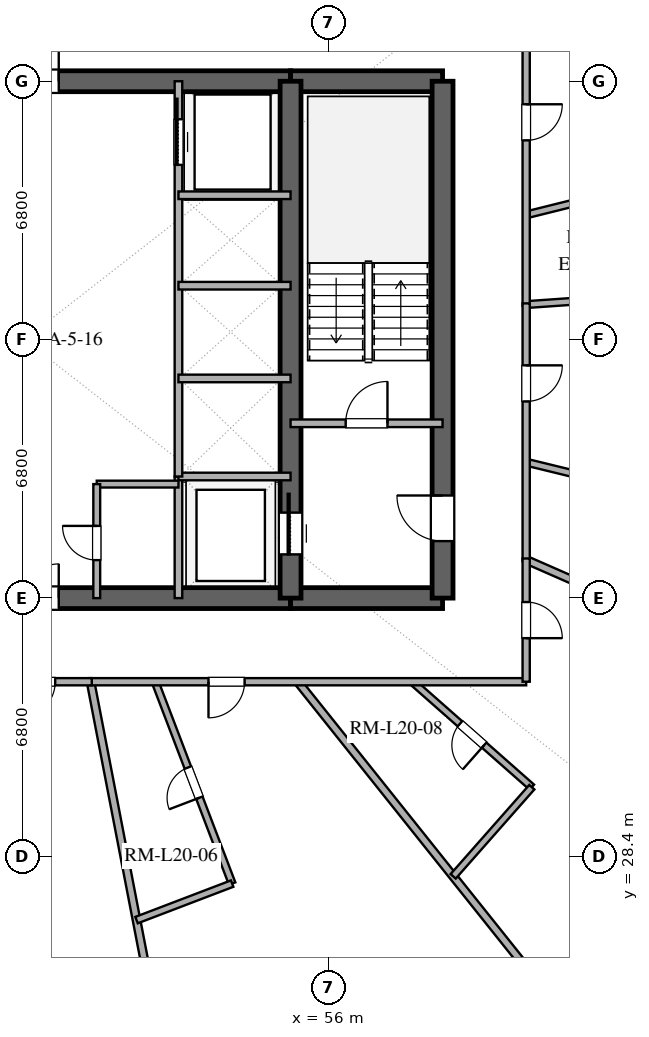
"""IFC4 building model, lengths in metres.
Left out: names, types, materials, properties, quantities, classifications, styles, units other than length and angle.
Written with IfcOpenShell. Run it as: python <this file> out.ifc"""

import sys

from ifc_helpers import new_model, si_unit, direction, frame, frame_2d, origin, place, context, subcontext, project, spatial, rectangle, extrude, element, fill, save


model = new_model("IFC4")
c1 = context("Model", 3, precision=1e-05, world=origin(), true_north=direction((0.0, 1.0)))
c2 = subcontext(c1, "Body", "Model", "MODEL_VIEW")
j1 = project(units=[si_unit("LENGTHUNIT", "METRE"), si_unit("PLANEANGLEUNIT", "RADIAN")], contexts=[c1])
p1 = place(None, origin())
s1 = spatial("IfcSite", under=j1, at=p1, CompositionType="ELEMENT")
p2 = place(p1, origin())
s2 = spatial("IfcBuilding", under=s1, at=p2, CompositionType="ELEMENT")
p3 = place(p2, frame((0.0, 0.0, 84.0)))
s3 = spatial("IfcBuildingStorey", under=s2, at=p3, CompositionType="ELEMENT", Elevation=84.0)
p4 = place(p3, frame((41.0, 35.2, 0.0), z_axis=(0.0, 0.0, 1.0), x_axis=(1.0, 0.0, 0.0)))
e1 = element("IfcWall", 1, at=p4, inside=s3, PredefinedType="SHEAR", context=c2, shape_type="SweptSolid", body=[
    extrude(rectangle(XDim=14.0, YDim=0.55, at=frame_2d((7.0, 0.0))), origin(), (0.0, 0.0, 1.0), 3.38),
])
p5 = place(p4, frame((6.1, 0.0, 0.0)))
e2 = element("IfcOpeningElement", 2, at=p5, cuts=e1, PredefinedType="OPENING", context=c2, shape_type="SweptSolid", body=[
    extrude(rectangle(XDim=1.8, YDim=2.25, at=frame_2d((0.9, 1.125))), frame((0.0, 0.285, 0.0), z_axis=(0.0, -1.0, 0.0), x_axis=(1.0, 0.0, 0.0)), (0.0, 0.0, 1.0), 0.57),
])
p6 = place(p3, frame((55.0, 35.2, 0.0), z_axis=(0.0, 0.0, 1.0), x_axis=(1.0, 0.0, 0.0)))
e3 = element("IfcWall", 3, at=p6, inside=s3, PredefinedType="SHEAR", context=c2, shape_type="SweptSolid", body=[
    extrude(rectangle(XDim=4.0, YDim=0.55, at=frame_2d((2.0, 0.0))), origin(), (0.0, 0.0, 1.0), 3.38),
])
p7 = place(p3, frame((41.0, 48.8, 0.0), z_axis=(0.0, 0.0, 1.0), x_axis=(1.0, 0.0, 0.0)))
e4 = element("IfcWall", 4, at=p7, inside=s3, PredefinedType="SHEAR", context=c2, shape_type="SweptSolid", body=[
    extrude(rectangle(XDim=14.0, YDim=0.55, at=frame_2d((7.0, 0.0))), origin(), (0.0, 0.0, 1.0), 3.38),
])
p8 = place(p7, frame((6.1, 0.0, 0.0)))
e5 = element("IfcOpeningElement", 5, at=p8, cuts=e4, PredefinedType="OPENING", context=c2, shape_type="SweptSolid", body=[
    extrude(rectangle(XDim=1.8, YDim=2.25, at=frame_2d((0.9, 1.125))), frame((0.0, 0.285, 0.0), z_axis=(0.0, -1.0, 0.0), x_axis=(1.0, 0.0, 0.0)), (0.0, 0.0, 1.0), 0.57),
])
p9 = place(p3, frame((55.0, 48.8, 0.0), z_axis=(0.0, 0.0, 1.0), x_axis=(1.0, 0.0, 0.0)))
e6 = element("IfcWall", 6, at=p9, inside=s3, PredefinedType="SHEAR", context=c2, shape_type="SweptSolid", body=[
    extrude(rectangle(XDim=4.0, YDim=0.55, at=frame_2d((2.0, 0.0))), origin(), (0.0, 0.0, 1.0), 3.38),
])
p10 = place(p3, frame((59.0, 35.2, 0.0), z_axis=(0.0, 0.0, 1.0), x_axis=(0.0, 1.0, 0.0)))
e7 = element("IfcWall", 7, at=p10, inside=s3, PredefinedType="SHEAR", context=c2, shape_type="SweptSolid", body=[
    extrude(rectangle(XDim=13.6, YDim=0.55, at=frame_2d((6.8, 0.0))), origin(), (0.0, 0.0, 1.0), 3.38),
])
p11 = place(p10, frame((1.5, 0.0, 0.0)))
e8 = element("IfcOpeningElement", 8, at=p11, cuts=e7, PredefinedType="OPENING", context=c2, shape_type="SweptSolid", body=[
    extrude(rectangle(XDim=1.2, YDim=2.15, at=frame_2d((0.6, 1.075))), frame((0.0, 0.285, 0.0), z_axis=(0.0, -1.0, 0.0), x_axis=(1.0, 0.0, 0.0)), (0.0, 0.0, 1.0), 0.57),
])
p12 = place(p3, frame((55.0, 35.2, 0.0), z_axis=(0.0, 0.0, 1.0), x_axis=(0.0, 1.0, 0.0)))
e9 = element("IfcWall", 9, at=p12, inside=s3, PredefinedType="SHEAR", context=c2, shape_type="SweptSolid", body=[
    extrude(rectangle(XDim=13.6, YDim=0.55, at=frame_2d((6.8, 0.0))), origin(), (0.0, 0.0, 1.0), 3.38),
])
p13 = place(p12, frame((1.15, 0.0, 0.0)))
e10 = element("IfcOpeningElement", 10, at=p13, cuts=e9, PredefinedType="OPENING", context=c2, shape_type="SweptSolid", body=[
    extrude(rectangle(XDim=1.1, YDim=2.2, at=frame_2d((0.55, 1.1))), frame((0.0, 0.285, 0.0), z_axis=(0.0, -1.0, 0.0), x_axis=(1.0, 0.0, 0.0)), (0.0, 0.0, 1.0), 0.57),
])
p14 = place(p3, frame((55.0, 39.8, 0.0), z_axis=(0.0, 0.0, 1.0), x_axis=(1.0, 0.0, 0.0)))
e11 = element("IfcWall", 11, at=p14, inside=s3, PredefinedType="SOLIDWALL", context=c2, shape_type="SweptSolid", body=[
    extrude(rectangle(XDim=4.0, YDim=0.2, at=frame_2d((2.0, 0.0))), origin(), (0.0, 0.0, 1.0), 2.74),
])
p15 = place(p14, frame((1.45, 0.0, 0.0)))
e12 = element("IfcOpeningElement", 12, at=p15, cuts=e11, PredefinedType="OPENING", context=c2, shape_type="SweptSolid", body=[
    extrude(rectangle(XDim=1.1, YDim=2.15, at=frame_2d((0.55, 1.075))), frame((0.0, 0.11, 0.0), z_axis=(0.0, -1.0, 0.0), x_axis=(1.0, 0.0, 0.0)), (0.0, 0.0, 1.0), 0.22),
])
p16 = place(p3, frame((52.05, 35.2, 0.0), z_axis=(0.0, 0.0, 1.0), x_axis=(0.0, 1.0, 0.0)))
e13 = element("IfcWall", 13, at=p16, inside=s3, PredefinedType="SOLIDWALL", context=c2, shape_type="SweptSolid", body=[
    extrude(rectangle(XDim=3.2, YDim=0.2, at=frame_2d((1.6, 0.0))), origin(), (0.0, 0.0, 1.0), 2.74),
])
p17 = place(p3, frame((52.05, 38.4, 0.0), z_axis=(0.0, 0.0, 1.0), x_axis=(1.0, 0.0, 0.0)))
e14 = element("IfcWall", 14, at=p17, inside=s3, PredefinedType="SOLIDWALL", context=c2, shape_type="SweptSolid", body=[
    extrude(rectangle(XDim=2.95, YDim=0.2, at=frame_2d((1.475, 0.0))), origin(), (0.0, 0.0, 1.0), 2.74),
])
p18 = place(p3, frame((52.05, 38.4, 0.0), z_axis=(0.0, 0.0, 1.0), x_axis=(0.0, 1.0, 0.0)))
e15 = element("IfcWall", 15, at=p18, inside=s3, PredefinedType="SOLIDWALL", context=c2, shape_type="SweptSolid", body=[
    extrude(rectangle(XDim=10.4, YDim=0.2, at=frame_2d((5.2, 0.0))), origin(), (0.0, 0.0, 1.0), 2.74),
])
p19 = place(p18, frame((8.2, 0.0, 0.0)))
e16 = element("IfcOpeningElement", 16, at=p19, cuts=e15, PredefinedType="OPENING", context=c2, shape_type="SweptSolid", body=[
    extrude(rectangle(XDim=1.2, YDim=2.2, at=frame_2d((0.6, 1.1))), frame((0.0, 0.11, 0.0), z_axis=(0.0, -1.0, 0.0), x_axis=(1.0, 0.0, 0.0)), (0.0, 0.0, 1.0), 0.22),
])
for number, where, z_axis, x_axis in (
    (17, (52.05, 40.98, 0.0), (0.0, 0.0, 1.0), (1.0, 0.0, 0.0)),
    (18, (52.05, 43.42, 0.0), (0.0, 0.0, 1.0), (1.0, 0.0, 0.0)),
    (19, (52.05, 45.8, 0.0), (0.0, 0.0, 1.0), (1.0, 0.0, 0.0)),
):
    element("IfcWall", number, at=place(p3, frame(where, z_axis=z_axis, x_axis=x_axis)), inside=s3, PredefinedType="SOLIDWALL", context=c2, shape_type="SweptSolid", body=[
        extrude(rectangle(XDim=2.95, YDim=0.2, at=frame_2d((1.475, 0.0))), origin(), (0.0, 0.0, 1.0), 2.74),
    ])
p20 = place(p3, frame((49.9, 38.2, 0.0), z_axis=(0.0, 0.0, 1.0), x_axis=(1.0, 0.0, 0.0)))
e20 = element("IfcWall", 20, at=p20, inside=s3, PredefinedType="PLUMBINGWALL", context=c2, shape_type="SweptSolid", body=[
    extrude(rectangle(XDim=2.15, YDim=0.18, at=frame_2d((1.075, 0.0))), origin(), (0.0, 0.0, 1.0), 2.74),
])
p21 = place(p3, frame((49.9, 35.2, 0.0), z_axis=(0.0, 0.0, 1.0), x_axis=(0.0, 1.0, 0.0)))
e21 = element("IfcWall", 21, at=p21, inside=s3, PredefinedType="PLUMBINGWALL", context=c2, shape_type="SweptSolid", body=[
    extrude(rectangle(XDim=3.0, YDim=0.18, at=frame_2d((1.5, 0.0))), origin(), (0.0, 0.0, 1.0), 2.74),
])
p22 = place(p21, frame((1.0, 0.0, 0.0)))
e22 = element("IfcOpeningElement", 22, at=p22, cuts=e21, PredefinedType="OPENING", context=c2, shape_type="SweptSolid", body=[
    extrude(rectangle(XDim=0.9, YDim=2.1, at=frame_2d((0.45, 1.05))), frame((0.0, 0.1, 0.0), z_axis=(0.0, -1.0, 0.0), x_axis=(1.0, 0.0, 0.0)), (0.0, 0.0, 1.0), 0.2),
])
p23 = place(p3, frame((68.224, 43.414, 0.0), z_axis=(0.0, 0.0, 1.0), x_axis=(-0.997563891584, -0.06975874287, 0.0)))
e23 = element("IfcWall", 23, at=p23, inside=s3, PredefinedType="PLUMBINGWALL", context=c2, shape_type="SweptSolid", body=[
    extrude(rectangle(XDim=7.042, YDim=0.18, at=frame_2d((3.521, 0.0))), origin(), (0.0, 0.0, 1.0), 2.74),
])
p24 = place(p3, frame((49.737, 33.0, 0.0), z_axis=(0.0, 0.0, 1.0), x_axis=(0.18949034594, -0.981882584017, 0.0)))
e24 = element("IfcWall", 24, at=p24, inside=s3, PredefinedType="PARTITIONING", context=c2, shape_type="SweptSolid", body=[
    extrude(rectangle(XDim=13.153, YDim=0.2, at=frame_2d((6.577, 0.0))), origin(), (0.0, 0.0, 1.0), 2.74),
])
p25 = place(p3, frame((61.2, 36.208, 0.0), z_axis=(0.0, 0.0, 1.0), x_axis=(0.915722078144, -0.401812239235, 0.0)))
e25 = element("IfcWall", 25, at=p25, inside=s3, PredefinedType="PARTITIONING", context=c2, shape_type="SweptSolid", body=[
    extrude(rectangle(XDim=12.915, YDim=0.2, at=frame_2d((6.458, 0.0))), origin(), (0.0, 0.0, 1.0), 2.74),
])
p26 = place(p3, frame((67.699, 37.189, 0.0), z_axis=(0.0, 0.0, 1.0), x_axis=(-0.971448370468, 0.237251055878, 0.0)))
e26 = element("IfcWall", 26, at=p26, inside=s3, PredefinedType="PLUMBINGWALL", context=c2, shape_type="SweptSolid", body=[
    extrude(rectangle(XDim=6.69, YDim=0.18, at=frame_2d((3.345, 0.0))), origin(), (0.0, 0.0, 1.0), 2.74),
])
p27 = place(p26, frame((2.92, 0.0, 0.0)))
e27 = element("IfcOpeningElement", 27, at=p27, cuts=e26, PredefinedType="OPENING", context=c2, shape_type="SweptSolid", body=[
    extrude(rectangle(XDim=0.85, YDim=2.1, at=frame_2d((0.425, 1.05))), frame((0.0, 0.1, 0.0), z_axis=(0.0, -1.0, 0.0), x_axis=(1.0, 0.0, 0.0)), (0.0, 0.0, 1.0), 0.2),
])
p28 = place(p3, frame((55.189, 33.0, 0.0), z_axis=(0.0, 0.0, 1.0), x_axis=(0.624085468444, -0.781356082767, 0.0)))
e28 = element("IfcWall", 28, at=p28, inside=s3, PredefinedType="PARTITIONING", context=c2, shape_type="SweptSolid", body=[
    extrude(rectangle(XDim=12.703, YDim=0.2, at=frame_2d((6.352, 0.0))), origin(), (0.0, 0.0, 1.0), 2.74),
])
p29 = place(p3, frame((61.2, 45.284, 0.0), z_axis=(0.0, 0.0, 1.0), x_axis=(0.970426102609, 0.241398383125, 0.0)))
e29 = element("IfcWall", 29, at=p29, inside=s3, PredefinedType="PLUMBINGWALL", context=c2, shape_type="SweptSolid", body=[
    extrude(rectangle(XDim=6.365, YDim=0.18, at=frame_2d((3.183, 0.0))), origin(), (0.0, 0.0, 1.0), 2.74),
])
p30 = place(p29, frame((2.758, 0.0, 0.0)))
e30 = element("IfcOpeningElement", 30, at=p30, cuts=e29, PredefinedType="OPENING", context=c2, shape_type="SweptSolid", body=[
    extrude(rectangle(XDim=0.85, YDim=2.1, at=frame_2d((0.425, 1.05))), frame((0.0, 0.1, 0.0), z_axis=(0.0, -1.0, 0.0), x_axis=(1.0, 0.0, 0.0)), (0.0, 0.0, 1.0), 0.2),
])
p31 = place(p3, frame((53.463, 27.688, 0.0), z_axis=(0.0, 0.0, 1.0), x_axis=(-0.356604128264, 0.934255583716, 0.0)))
e31 = element("IfcWall", 31, at=p31, inside=s3, PredefinedType="PLUMBINGWALL", context=c2, shape_type="SweptSolid", body=[
    extrude(rectangle(XDim=5.686, YDim=0.18, at=frame_2d((2.843, 0.0))), origin(), (0.0, 0.0, 1.0), 2.74),
])
p32 = place(p31, frame((2.418, 0.0, 0.0)))
e32 = element("IfcOpeningElement", 32, at=p32, cuts=e31, PredefinedType="OPENING", context=c2, shape_type="SweptSolid", body=[
    extrude(rectangle(XDim=0.85, YDim=2.1, at=frame_2d((0.425, 1.05))), frame((0.0, 0.1, 0.0), z_axis=(0.0, -1.0, 0.0), x_axis=(1.0, 0.0, 0.0)), (0.0, 0.0, 1.0), 0.2),
])
p33 = place(p3, frame((61.2, 51.0, 0.0), z_axis=(0.0, 0.0, 1.0), x_axis=(0.0, -1.0, 0.0)))
e33 = element("IfcWall", 33, at=p33, inside=s3, PredefinedType="PARTITIONING", context=c2, shape_type="SweptSolid", body=[
    extrude(rectangle(XDim=8.109, YDim=0.19, at=frame_2d((4.055, 0.0))), origin(), (0.0, 0.0, 1.0), 2.74),
])
p34 = place(p33, frame((2.806, 0.0, 0.0)))
e34 = element("IfcOpeningElement", 34, at=p34, cuts=e33, PredefinedType="OPENING", context=c2, shape_type="SweptSolid", body=[
    extrude(rectangle(XDim=0.95, YDim=2.15, at=frame_2d((0.475, 1.075))), frame((0.0, 0.105, 0.0), z_axis=(0.0, -1.0, 0.0), x_axis=(1.0, 0.0, 0.0)), (0.0, 0.0, 1.0), 0.21),
])
p35 = place(p3, frame((61.2, 42.955, 0.0), z_axis=(0.0, 0.0, 1.0), x_axis=(0.0, -1.0, 0.0)))
e35 = element("IfcWall", 35, at=p35, inside=s3, PredefinedType="PARTITIONING", context=c2, shape_type="SweptSolid", body=[
    extrude(rectangle(XDim=6.782, YDim=0.19, at=frame_2d((3.391, 0.0))), origin(), (0.0, 0.0, 1.0), 2.74),
])
p36 = place(p35, frame((1.631, 0.0, 0.0)))
e36 = element("IfcOpeningElement", 36, at=p36, cuts=e35, PredefinedType="OPENING", context=c2, shape_type="SweptSolid", body=[
    extrude(rectangle(XDim=0.95, YDim=2.15, at=frame_2d((0.475, 1.075))), frame((0.0, 0.105, 0.0), z_axis=(0.0, -1.0, 0.0), x_axis=(1.0, 0.0, 0.0)), (0.0, 0.0, 1.0), 0.21),
])
p37 = place(p3, frame((61.348, 30.225, 0.0), z_axis=(0.0, 0.0, 1.0), x_axis=(-0.749931272561, 0.661515749197, 0.0)))
e37 = element("IfcWall", 37, at=p37, inside=s3, PredefinedType="PLUMBINGWALL", context=c2, shape_type="SweptSolid", body=[
    extrude(rectangle(XDim=4.194, YDim=0.18, at=frame_2d((2.097, 0.0))), origin(), (0.0, 0.0, 1.0), 2.74),
])
p38 = place(p37, frame((1.672, 0.0, 0.0)))
e38 = element("IfcOpeningElement", 38, at=p38, cuts=e37, PredefinedType="OPENING", context=c2, shape_type="SweptSolid", body=[
    extrude(rectangle(XDim=0.85, YDim=2.1, at=frame_2d((0.425, 1.05))), frame((0.0, 0.1, 0.0), z_axis=(0.0, -1.0, 0.0), x_axis=(1.0, 0.0, 0.0)), (0.0, 0.0, 1.0), 0.2),
])
p39 = place(p3, frame((61.2, 33.0, 0.0), z_axis=(0.0, 0.0, 1.0), x_axis=(-1.0, 0.0, 0.0)))
e39 = element("IfcWall", 39, at=p39, inside=s3, PredefinedType="PARTITIONING", context=c2, shape_type="SweptSolid", body=[
    extrude(rectangle(XDim=11.496, YDim=0.19, at=frame_2d((5.748, 0.0))), origin(), (0.0, 0.0, 1.0), 2.74),
])
p40 = place(p39, frame((7.41, 0.0, 0.0)))
e40 = element("IfcOpeningElement", 40, at=p40, cuts=e39, PredefinedType="OPENING", context=c2, shape_type="SweptSolid", body=[
    extrude(rectangle(XDim=0.95, YDim=2.15, at=frame_2d((0.475, 1.075))), frame((0.0, 0.105, 0.0), z_axis=(0.0, -1.0, 0.0), x_axis=(1.0, 0.0, 0.0)), (0.0, 0.0, 1.0), 0.21),
])
p41 = place(p3, frame((61.2, 36.243, 0.0), z_axis=(0.0, 0.0, 1.0), x_axis=(0.0, -1.0, 0.0)))
e41 = element("IfcWall", 41, at=p41, inside=s3, PredefinedType="PARTITIONING", context=c2, shape_type="SweptSolid", body=[
    extrude(rectangle(XDim=3.243, YDim=0.19, at=frame_2d((1.621, 0.0))), origin(), (0.0, 0.0, 1.0), 2.74),
])
p42 = place(p41, frame((1.146, 0.0, 0.0)))
e42 = element("IfcOpeningElement", 42, at=p42, cuts=e41, PredefinedType="OPENING", context=c2, shape_type="SweptSolid", body=[
    extrude(rectangle(XDim=0.95, YDim=2.15, at=frame_2d((0.475, 1.075))), frame((0.0, 0.105, 0.0), z_axis=(0.0, -1.0, 0.0), x_axis=(1.0, 0.0, 0.0)), (0.0, 0.0, 1.0), 0.21),
])
p43 = place(p3, frame((59.279, 27.879, 0.0), z_axis=(0.0, 0.0, 1.0), x_axis=(0.661515810511, 0.749931218475, 0.0)))
e43 = element("IfcWall", 43, at=p43, inside=s3, PredefinedType="PLUMBINGWALL", context=c2, shape_type="SweptSolid", body=[
    extrude(rectangle(XDim=3.129, YDim=0.18, at=frame_2d((1.564, 0.0))), origin(), (0.0, 0.0, 1.0), 2.74),
])
p44 = place(p3, frame((49.77, 33.0, 0.0), z_axis=(0.0, 0.0, 1.0), x_axis=(-1.0, 0.0, 0.0)))
e44 = element("IfcWall", 44, at=p44, inside=s3, PredefinedType="PARTITIONING", context=c2, shape_type="SweptSolid", body=[
    extrude(rectangle(XDim=2.875, YDim=0.19, at=frame_2d((1.438, 0.0))), origin(), (0.0, 0.0, 1.0), 2.74),
])
p45 = place(p44, frame((0.962, 0.0, 0.0)))
e45 = element("IfcOpeningElement", 45, at=p45, cuts=e44, PredefinedType="OPENING", context=c2, shape_type="SweptSolid", body=[
    extrude(rectangle(XDim=0.95, YDim=2.15, at=frame_2d((0.475, 1.075))), frame((0.0, 0.105, 0.0), z_axis=(0.0, -1.0, 0.0), x_axis=(1.0, 0.0, 0.0)), (0.0, 0.0, 1.0), 0.21),
])
p46 = place(p3, frame((50.948, 26.728, 0.0), z_axis=(0.0, 0.0, 1.0), x_axis=(0.934244754769, 0.35663249738, 0.0)))
e46 = element("IfcWall", 46, at=p46, inside=s3, PredefinedType="PLUMBINGWALL", context=c2, shape_type="SweptSolid", body=[
    extrude(rectangle(XDim=2.692, YDim=0.18, at=frame_2d((1.346, 0.0))), origin(), (0.0, 0.0, 1.0), 2.74),
])
p47 = place(p13, origin())
e47 = element("IfcDoor", 47, at=p47, inside=s3, OperationType="SLIDING_TO_RIGHT", PredefinedType="DOOR", context=c2, shape_type="SweptSolid", body=[
    extrude(rectangle(XDim=1.1, YDim=2.2, at=frame_2d((0.55, 1.1))), frame((0.0, 0.025, 0.0), z_axis=(0.0, -1.0, 0.0), x_axis=(1.0, 0.0, 0.0)), (0.0, 0.0, 1.0), 0.05),
])
fill(e10, e47)
p48 = place(p11, origin())
e48 = element("IfcDoor", 48, at=p48, inside=s3, OperationType="SINGLE_SWING_RIGHT", PredefinedType="DOOR", context=c2, shape_type="SweptSolid", body=[
    extrude(rectangle(XDim=1.2, YDim=2.15, at=frame_2d((0.6, 1.075))), frame((0.0, 0.025, 0.0), z_axis=(0.0, -1.0, 0.0), x_axis=(1.0, 0.0, 0.0)), (0.0, 0.0, 1.0), 0.05),
])
fill(e8, e48)
p49 = place(p5, origin())
e49 = element("IfcDoor", 49, at=p49, inside=s3, OperationType="DOUBLE_DOOR_SINGLE_SWING", PredefinedType="DOOR", context=c2, shape_type="SweptSolid", body=[
    extrude(rectangle(XDim=1.8, YDim=2.25, at=frame_2d((0.9, 1.125))), frame((0.0, 0.025, 0.0), z_axis=(0.0, -1.0, 0.0), x_axis=(1.0, 0.0, 0.0)), (0.0, 0.0, 1.0), 0.05),
])
fill(e2, e49)
p50 = place(p8, origin())
e50 = element("IfcDoor", 50, at=p50, inside=s3, OperationType="DOUBLE_DOOR_SINGLE_SWING", PredefinedType="DOOR", context=c2, shape_type="SweptSolid", body=[
    extrude(rectangle(XDim=1.8, YDim=2.25, at=frame_2d((0.9, 1.125))), frame((0.0, 0.025, 0.0), z_axis=(0.0, -1.0, 0.0), x_axis=(1.0, 0.0, 0.0)), (0.0, 0.0, 1.0), 0.05),
])
fill(e5, e50)
p51 = place(p15, origin())
e51 = element("IfcDoor", 51, at=p51, inside=s3, OperationType="SINGLE_SWING_RIGHT", PredefinedType="DOOR", context=c2, shape_type="SweptSolid", body=[
    extrude(rectangle(XDim=1.1, YDim=2.15, at=frame_2d((0.55, 1.075))), frame((0.0, 0.025, 0.0), z_axis=(0.0, -1.0, 0.0), x_axis=(1.0, 0.0, 0.0)), (0.0, 0.0, 1.0), 0.05),
])
fill(e12, e51)
p52 = place(p19, origin())
e52 = element("IfcDoor", 52, at=p52, inside=s3, OperationType="SLIDING_TO_RIGHT", PredefinedType="DOOR", context=c2, shape_type="SweptSolid", body=[
    extrude(rectangle(XDim=1.2, YDim=2.2, at=frame_2d((0.6, 1.1))), frame((0.0, 0.025, 0.0), z_axis=(0.0, -1.0, 0.0), x_axis=(1.0, 0.0, 0.0)), (0.0, 0.0, 1.0), 0.05),
])
fill(e16, e52)
p53 = place(p22, origin())
e53 = element("IfcDoor", 53, at=p53, inside=s3, OperationType="SINGLE_SWING_RIGHT", PredefinedType="DOOR", context=c2, shape_type="SweptSolid", body=[
    extrude(rectangle(XDim=0.9, YDim=2.1, at=frame_2d((0.45, 1.05))), frame((0.0, 0.025, 0.0), z_axis=(0.0, -1.0, 0.0), x_axis=(1.0, 0.0, 0.0)), (0.0, 0.0, 1.0), 0.05),
])
fill(e22, e53)
p54 = place(p32, origin())
e54 = element("IfcDoor", 54, at=p54, inside=s3, OperationType="SINGLE_SWING_LEFT", PredefinedType="DOOR", context=c2, shape_type="SweptSolid", body=[
    extrude(rectangle(XDim=0.85, YDim=2.1, at=frame_2d((0.425, 1.05))), frame((0.0, 0.025, 0.0), z_axis=(0.0, -1.0, 0.0), x_axis=(1.0, 0.0, 0.0)), (0.0, 0.0, 1.0), 0.05),
])
fill(e32, e54)
p55 = place(p34, origin())
e55 = element("IfcDoor", 55, at=p55, inside=s3, OperationType="SINGLE_SWING_LEFT", PredefinedType="DOOR", context=c2, shape_type="SweptSolid", body=[
    extrude(rectangle(XDim=0.95, YDim=2.15, at=frame_2d((0.475, 1.075))), frame((0.0, 0.025, 0.0), z_axis=(0.0, -1.0, 0.0), x_axis=(1.0, 0.0, 0.0)), (0.0, 0.0, 1.0), 0.05),
])
fill(e34, e55)
p56 = place(p36, origin())
e56 = element("IfcDoor", 56, at=p56, inside=s3, OperationType="SINGLE_SWING_LEFT", PredefinedType="DOOR", context=c2, shape_type="SweptSolid", body=[
    extrude(rectangle(XDim=0.95, YDim=2.15, at=frame_2d((0.475, 1.075))), frame((0.0, 0.025, 0.0), z_axis=(0.0, -1.0, 0.0), x_axis=(1.0, 0.0, 0.0)), (0.0, 0.0, 1.0), 0.05),
])
fill(e36, e56)
p57 = place(p38, origin())
e57 = element("IfcDoor", 57, at=p57, inside=s3, OperationType="SINGLE_SWING_LEFT", PredefinedType="DOOR", context=c2, shape_type="SweptSolid", body=[
    extrude(rectangle(XDim=0.85, YDim=2.1, at=frame_2d((0.425, 1.05))), frame((0.0, 0.025, 0.0), z_axis=(0.0, -1.0, 0.0), x_axis=(1.0, 0.0, 0.0)), (0.0, 0.0, 1.0), 0.05),
])
fill(e38, e57)
p58 = place(p40, origin())
e58 = element("IfcDoor", 58, at=p58, inside=s3, OperationType="SINGLE_SWING_RIGHT", PredefinedType="DOOR", context=c2, shape_type="SweptSolid", body=[
    extrude(rectangle(XDim=0.95, YDim=2.15, at=frame_2d((0.475, 1.075))), frame((0.0, 0.025, 0.0), z_axis=(0.0, -1.0, 0.0), x_axis=(1.0, 0.0, 0.0)), (0.0, 0.0, 1.0), 0.05),
])
fill(e40, e58)
p59 = place(p42, origin())
e59 = element("IfcDoor", 59, at=p59, inside=s3, OperationType="SINGLE_SWING_RIGHT", PredefinedType="DOOR", context=c2, shape_type="SweptSolid", body=[
    extrude(rectangle(XDim=0.95, YDim=2.15, at=frame_2d((0.475, 1.075))), frame((0.0, 0.025, 0.0), z_axis=(0.0, -1.0, 0.0), x_axis=(1.0, 0.0, 0.0)), (0.0, 0.0, 1.0), 0.05),
])
fill(e42, e59)
p60 = place(p45, origin())
e60 = element("IfcDoor", 60, at=p60, inside=s3, OperationType="SINGLE_SWING_RIGHT", PredefinedType="DOOR", context=c2, shape_type="SweptSolid", body=[
    extrude(rectangle(XDim=0.95, YDim=2.15, at=frame_2d((0.475, 1.075))), frame((0.0, 0.025, 0.0), z_axis=(0.0, -1.0, 0.0), x_axis=(1.0, 0.0, 0.0)), (0.0, 0.0, 1.0), 0.05),
])
fill(e45, e60)
save(model, sys.argv[1])
